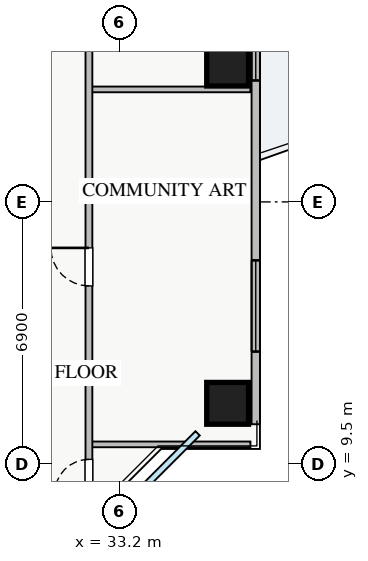
"""IFC4 building model, lengths in metres.
Left out: names, types, materials, properties, quantities, classifications, styles, units other than length and angle.
Written with IfcOpenShell. Run it as: python <this file> out.ifc"""

import sys

from ifc_helpers import new_model, si_unit, direction, frame, frame_2d, origin, origin_2d, place, context, subcontext, project, spatial, rectangle, extrude, source, transform, mapped, element, fill, save


model = new_model("IFC4")
c1 = context("Model", 3, precision=1e-05, world=origin(), true_north=direction((0.0, 1.0)))
c2 = subcontext(c1, "Body", "Model", "MODEL_VIEW")
j1 = project(units=[si_unit("LENGTHUNIT", "METRE"), si_unit("PLANEANGLEUNIT", "RADIAN")], contexts=[c1])
p1 = place(None, origin())
s1 = spatial("IfcSite", under=j1, at=p1, CompositionType="ELEMENT")
p2 = place(p1, origin())
s2 = spatial("IfcBuilding", under=s1, at=p2, CompositionType="ELEMENT")
p3 = place(p2, frame((0.0, 0.0, 103.5)))
s3 = spatial("IfcBuildingStorey", under=s2, at=p3, CompositionType="ELEMENT", Elevation=103.5)
m1 = source(origin(), c2, "Body", "SweptSolid", [
    extrude(rectangle(XDim=1.1, YDim=1.1, at=origin_2d()), origin(), (0.0, 0.0, 1.0), 3.25),
])
for number, where, z_axis, x_axis in (
    (1, (36.05, 11.1, 0.0), (0.0, 0.0, 1.0), (1.0, 0.0, 0.0)),
    (2, (36.05, 20.0, 0.0), (0.0, 0.0, 1.0), (1.0, 0.0, 0.0)),
):
    element("IfcColumn", number, at=place(p3, frame(where, z_axis=z_axis, x_axis=x_axis)), inside=s3, PredefinedType="COLUMN", context=c2, shape_type="MappedRepresentation", body=[
        mapped(m1, transform((0.0, 0.0, 0.0), x_axis=(1.0, 0.0, 0.0), y_axis=(0.0, 1.0, 0.0), z_axis=(0.0, 0.0, 1.0), scale=1.0)),
    ])
p4 = place(p3, frame((36.79, 10.55, 0.0), z_axis=(0.0, 0.0, 1.0), x_axis=(0.0, 1.0, 0.0)))
e3 = element("IfcWall", 3, at=p4, inside=s3, PredefinedType="STANDARD", context=c2, shape_type="SweptSolid", body=[
    extrude(rectangle(XDim=24.9, YDim=0.22, at=frame_2d((12.45, 0.0))), origin(), (0.0, 0.0, 1.0), 2.61),
])
p5 = place(p4, frame((13.3, 0.0, 0.0)))
e4 = element("IfcOpeningElement", 4, at=p5, cuts=e3, PredefinedType="OPENING", context=c2, shape_type="SweptSolid", body=[
    extrude(rectangle(XDim=1.2, YDim=2.1, at=frame_2d((0.6, 1.05))), frame((0.0, 0.12, 0.0), z_axis=(0.0, -1.0, 0.0), x_axis=(1.0, 0.0, 0.0)), (0.0, 0.0, 1.0), 0.24),
])
p6 = place(p4, frame((1.912, 0.0, 0.9)))
e5 = element("IfcOpeningElement", 5, at=p6, cuts=e3, PredefinedType="OPENING", context=c2, shape_type="SweptSolid", body=[
    extrude(rectangle(XDim=2.4, YDim=1.48, at=frame_2d((1.2, 0.74))), frame((0.0, 0.12, 0.0), z_axis=(0.0, -1.0, 0.0), x_axis=(1.0, 0.0, 0.0)), (0.0, 0.0, 1.0), 0.24),
])
p7 = place(p4, frame((22.165, 0.0, 0.9)))
e6 = element("IfcOpeningElement", 6, at=p7, cuts=e3, PredefinedType="OPENING", context=c2, shape_type="SweptSolid", body=[
    extrude(rectangle(XDim=2.1, YDim=1.5, at=frame_2d((1.05, 0.75))), frame((0.0, 0.12, 0.0), z_axis=(0.0, -1.0, 0.0), x_axis=(1.0, 0.0, 0.0)), (0.0, 0.0, 1.0), 0.24),
])
p8 = place(p4, frame((18.093, 0.0, 0.9)))
e7 = element("IfcOpeningElement", 7, at=p8, cuts=e3, PredefinedType="OPENING", context=c2, shape_type="SweptSolid", body=[
    extrude(rectangle(XDim=2.4, YDim=1.5, at=frame_2d((1.2, 0.75))), frame((0.0, 0.12, 0.0), z_axis=(0.0, -1.0, 0.0), x_axis=(1.0, 0.0, 0.0)), (0.0, 0.0, 1.0), 0.24),
])
p9 = place(p4, frame((9.045, 0.0, 0.9)))
e8 = element("IfcOpeningElement", 8, at=p9, cuts=e3, PredefinedType="OPENING", context=c2, shape_type="SweptSolid", body=[
    extrude(rectangle(XDim=0.9, YDim=1.2, at=frame_2d((0.45, 0.6))), frame((0.0, 0.12, 0.0), z_axis=(0.0, -1.0, 0.0), x_axis=(1.0, 0.0, 0.0)), (0.0, 0.0, 1.0), 0.24),
])
for number, where, z_axis, x_axis in (
    (9, (32.4, 10.02, 0.0), (0.0, 0.0, 1.0), (1.0, 0.0, 0.0)),
    (10, (32.4, 19.36, 0.0), (0.0, 0.0, 1.0), (1.0, 0.0, 0.0)),
):
    element("IfcWall", number, at=place(p3, frame(where, z_axis=z_axis, x_axis=x_axis)), inside=s3, PredefinedType="PARTITIONING", context=c2, shape_type="SweptSolid", body=[
        extrude(rectangle(XDim=4.25, YDim=0.15, at=frame_2d((2.125, 0.0))), origin(), (0.0, 0.0, 1.0), 3.07),
    ])
p10 = place(p3, frame((32.4, 8.31, 0.0), z_axis=(0.0, 0.0, 1.0), x_axis=(0.0, 1.0, 0.0)))
e11 = element("IfcWall", 11, at=p10, inside=s3, PredefinedType="PARTITIONING", context=c2, shape_type="SweptSolid", body=[
    extrude(rectangle(XDim=29.13, YDim=0.18, at=frame_2d((14.565, 0.0))), origin(), (0.0, 0.0, 1.0), 3.07),
])
p11 = place(p10, frame((27.94, 0.0, 0.0)))
e12 = element("IfcOpeningElement", 12, at=p11, cuts=e11, PredefinedType="OPENING", context=c2, shape_type="SweptSolid", body=[
    extrude(rectangle(XDim=0.9, YDim=2.05, at=frame_2d((0.45, 1.025))), frame((0.0, 0.1, 0.0), z_axis=(0.0, -1.0, 0.0), x_axis=(1.0, 0.0, 0.0)), (0.0, 0.0, 1.0), 0.2),
])
p12 = place(p10, frame((0.415, 0.0, 0.0)))
e13 = element("IfcOpeningElement", 13, at=p12, cuts=e11, PredefinedType="OPENING", context=c2, shape_type="SweptSolid", body=[
    extrude(rectangle(XDim=0.9, YDim=2.05, at=frame_2d((0.45, 1.025))), frame((0.0, 0.1, 0.0), z_axis=(0.0, -1.0, 0.0), x_axis=(1.0, 0.0, 0.0)), (0.0, 0.0, 1.0), 0.2),
])
p13 = place(p10, frame((5.88, 0.0, 0.0)))
e14 = element("IfcOpeningElement", 14, at=p13, cuts=e11, PredefinedType="OPENING", context=c2, shape_type="SweptSolid", body=[
    extrude(rectangle(XDim=1.0, YDim=2.05, at=frame_2d((0.5, 1.025))), frame((0.0, 0.1, 0.0), z_axis=(0.0, -1.0, 0.0), x_axis=(1.0, 0.0, 0.0)), (0.0, 0.0, 1.0), 0.2),
])
p14 = place(p10, frame((12.23, 0.0, 0.0)))
e15 = element("IfcOpeningElement", 15, at=p14, cuts=e11, PredefinedType="OPENING", context=c2, shape_type="SweptSolid", body=[
    extrude(rectangle(XDim=1.0, YDim=2.05, at=frame_2d((0.5, 1.025))), frame((0.0, 0.1, 0.0), z_axis=(0.0, -1.0, 0.0), x_axis=(1.0, 0.0, 0.0)), (0.0, 0.0, 1.0), 0.2),
])
p15 = place(p10, frame((20.835, 0.0, 0.0)))
e16 = element("IfcOpeningElement", 16, at=p15, cuts=e11, PredefinedType="OPENING", context=c2, shape_type="SweptSolid", body=[
    extrude(rectangle(XDim=1.0, YDim=2.05, at=frame_2d((0.5, 1.025))), frame((0.0, 0.1, 0.0), z_axis=(0.0, -1.0, 0.0), x_axis=(1.0, 0.0, 0.0)), (0.0, 0.0, 1.0), 0.2),
])
m2 = source(origin(), c2, "Body", "SweptSolid", [
    extrude(rectangle(XDim=2.4, YDim=1.48, at=frame_2d((1.2, 0.74))), frame((0.0, 0.03, 0.0), z_axis=(0.0, -1.0, 0.0), x_axis=(1.0, 0.0, 0.0)), (0.0, 0.0, 1.0), 0.06),
])
p16 = place(p6, origin())
e17 = element("IfcWindow", 17, at=p16, inside=s3, PartitioningType="TRIPLE_PANEL_VERTICAL", PredefinedType="WINDOW", context=c2, shape_type="MappedRepresentation", body=[
    mapped(m2, transform((0.0, 0.0, 0.0), x_axis=(1.0, 0.0, 0.0), y_axis=(0.0, 1.0, 0.0), z_axis=(0.0, 0.0, 1.0), scale=1.0)),
])
fill(e5, e17)
m3 = source(origin(), c2, "Body", "SweptSolid", [
    extrude(rectangle(XDim=0.9, YDim=2.05, at=frame_2d((0.45, 1.025))), frame((0.0, 0.025, 0.0), z_axis=(0.0, -1.0, 0.0), x_axis=(1.0, 0.0, 0.0)), (0.0, 0.0, 1.0), 0.05),
])
p17 = place(p12, origin())
e18 = element("IfcDoor", 18, at=p17, inside=s3, OperationType="SINGLE_SWING_LEFT", PredefinedType="DOOR", context=c2, shape_type="MappedRepresentation", body=[
    mapped(m3, transform((0.0, 0.0, 0.0), x_axis=(1.0, 0.0, 0.0), y_axis=(0.0, 1.0, 0.0), z_axis=(0.0, 0.0, 1.0), scale=1.0)),
])
fill(e13, e18)
m4 = source(origin(), c2, "Body", "SweptSolid", [
    extrude(rectangle(XDim=1.0, YDim=2.05, at=frame_2d((0.5, 1.025))), frame((0.0, 0.025, 0.0), z_axis=(0.0, -1.0, 0.0), x_axis=(1.0, 0.0, 0.0)), (0.0, 0.0, 1.0), 0.05),
])
p18 = place(p13, origin())
e19 = element("IfcDoor", 19, at=p18, inside=s3, OperationType="SINGLE_SWING_RIGHT", PredefinedType="DOOR", context=c2, shape_type="MappedRepresentation", body=[
    mapped(m4, transform((0.0, 0.0, 0.0), x_axis=(1.0, 0.0, 0.0), y_axis=(0.0, 1.0, 0.0), z_axis=(0.0, 0.0, 1.0), scale=1.0)),
])
fill(e14, e19)
m5 = source(origin(), c2, "Body", "SweptSolid", [
    extrude(rectangle(XDim=0.9, YDim=1.2, at=frame_2d((0.45, 0.6))), frame((0.0, 0.03, 0.0), z_axis=(0.0, -1.0, 0.0), x_axis=(1.0, 0.0, 0.0)), (0.0, 0.0, 1.0), 0.06),
])
p19 = place(p9, origin())
e20 = element("IfcWindow", 20, at=p19, inside=s3, PartitioningType="SINGLE_PANEL", PredefinedType="WINDOW", context=c2, shape_type="MappedRepresentation", body=[
    mapped(m5, transform((0.0, 0.0, 0.0), x_axis=(1.0, 0.0, 0.0), y_axis=(0.0, 1.0, 0.0), z_axis=(0.0, 0.0, 1.0), scale=1.0)),
])
fill(e8, e20)
save(model, sys.argv[1])
